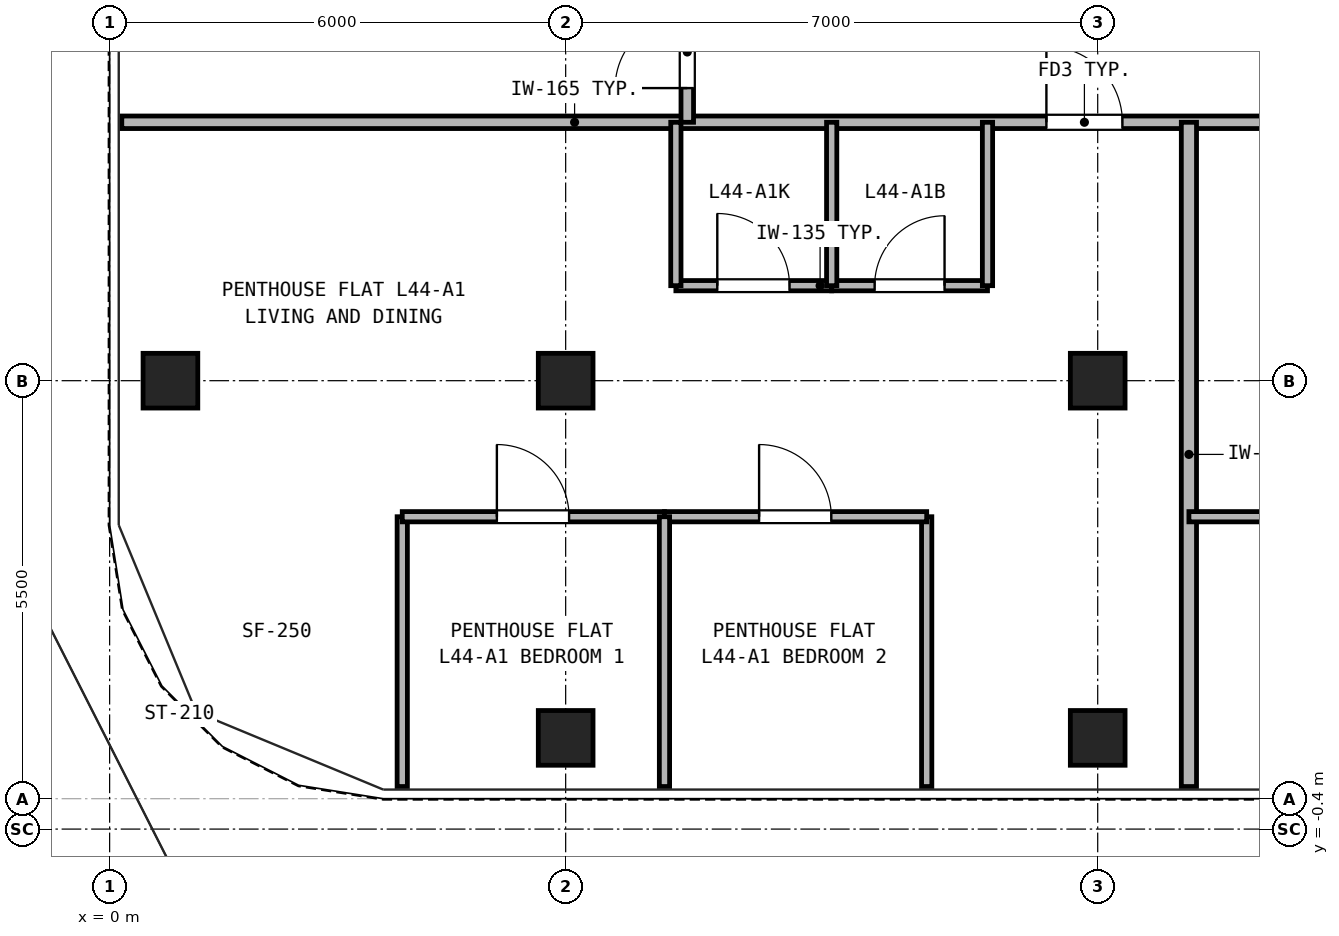
"""IFC4 building model, lengths in metres.
Left out: names, types, materials, properties, quantities, classifications, styles, units other than length and angle.
Written with IfcOpenShell. Run it as: python <this file> out.ifc"""

import sys

from ifc_helpers import new_model, si_unit, direction, frame, frame_2d, origin, origin_2d, place, context, subcontext, project, spatial, rectangle, hollow_rectangle, extrude, source, transform, mapped, element, fill, save


model = new_model("IFC4")
c1 = context("Model", 3, precision=1e-05, world=origin(), true_north=direction((0.0, 1.0)))
c2 = subcontext(c1, "Body", "Model", "MODEL_VIEW")
j1 = project(units=[si_unit("LENGTHUNIT", "METRE"), si_unit("PLANEANGLEUNIT", "RADIAN")], contexts=[c1])
p1 = place(None, origin())
s1 = spatial("IfcSite", under=j1, at=p1, CompositionType="ELEMENT")
p2 = place(p1, origin())
s2 = spatial("IfcBuilding", under=s1, at=p2, CompositionType="ELEMENT")
p3 = place(p2, frame((0.0, 0.0, 159.3)))
s3 = spatial("IfcBuildingStorey", under=s2, at=p3, CompositionType="ELEMENT", Elevation=159.3)
m1 = source(origin(), c2, "Body", "SweptSolid", [
    extrude(hollow_rectangle(XDim=0.72, YDim=0.72, WallThickness=0.04, at=origin_2d()), origin(), (0.0, 0.0, 1.0), 2.95),
])
for number, where, z_axis, x_axis in (
    (1, (6.0, 0.8, 0.0), (0.0, 0.0, 1.0), (1.0, 0.0, 0.0)),
    (2, (13.0, 0.8, 0.0), (0.0, 0.0, 1.0), (1.0, 0.0, 0.0)),
    (3, (0.8, 5.5, 0.0), (0.0, 0.0, 1.0), (1.0, 0.0, 0.0)),
    (4, (6.0, 5.5, 0.0), (0.0, 0.0, 1.0), (1.0, 0.0, 0.0)),
    (5, (13.0, 5.5, 0.0), (0.0, 0.0, 1.0), (1.0, 0.0, 0.0)),
):
    element("IfcColumn", number, at=place(p3, frame(where, z_axis=z_axis, x_axis=x_axis)), inside=s3, PredefinedType="COLUMN", context=c2, shape_type="MappedRepresentation", body=[
        mapped(m1, transform((0.0, 0.0, 0.0), x_axis=(1.0, 0.0, 0.0), y_axis=(0.0, 1.0, 0.0), z_axis=(0.0, 0.0, 1.0), scale=1.0)),
    ])
p4 = place(p3, frame((0.16, 8.9, 0.0), z_axis=(0.0, 0.0, 1.0), x_axis=(1.0, 0.0, 0.0)))
e6 = element("IfcWall", 6, at=p4, inside=s3, PredefinedType="PARTITIONING", context=c2, shape_type="SweptSolid", body=[
    extrude(rectangle(XDim=41.48, YDim=0.165, at=frame_2d((20.74, 0.0))), origin(), (0.0, 0.0, 1.0), 2.95),
])
p5 = place(p4, frame((12.165, 0.0, 0.0)))
e7 = element("IfcOpeningElement", 7, at=p5, cuts=e6, PredefinedType="OPENING", context=c2, shape_type="SweptSolid", body=[
    extrude(rectangle(XDim=1.0, YDim=2.15, at=frame_2d((0.5, 1.075))), frame((0.0, 0.093, 0.0), z_axis=(0.0, -1.0, 0.0), x_axis=(1.0, 0.0, 0.0)), (0.0, 0.0, 1.0), 0.185),
])
p6 = place(p4, frame((17.965, 0.0, 0.0)))
e8 = element("IfcOpeningElement", 8, at=p6, cuts=e6, PredefinedType="OPENING", context=c2, shape_type="SweptSolid", body=[
    extrude(rectangle(XDim=1.0, YDim=2.15, at=frame_2d((0.5, 1.075))), frame((0.0, 0.093, 0.0), z_axis=(0.0, -1.0, 0.0), x_axis=(1.0, 0.0, 0.0)), (0.0, 0.0, 1.0), 0.185),
])
p7 = place(p4, frame((31.115, 0.0, 0.0)))
e9 = element("IfcOpeningElement", 9, at=p7, cuts=e6, PredefinedType="OPENING", context=c2, shape_type="SweptSolid", body=[
    extrude(rectangle(XDim=1.0, YDim=2.15, at=frame_2d((0.5, 1.075))), frame((0.0, 0.093, 0.0), z_axis=(0.0, -1.0, 0.0), x_axis=(1.0, 0.0, 0.0)), (0.0, 0.0, 1.0), 0.185),
])
p8 = place(p3, frame((7.6, 8.9, 0.0), z_axis=(0.0, 0.0, 1.0), x_axis=(0.0, 1.0, 0.0)))
e10 = element("IfcWall", 10, at=p8, inside=s3, PredefinedType="PARTITIONING", context=c2, shape_type="SweptSolid", body=[
    extrude(rectangle(XDim=2.0, YDim=0.165, at=frame_2d((1.0, 0.0))), origin(), (0.0, 0.0, 1.0), 2.95),
])
p9 = place(p8, frame((0.45, 0.0, 0.0)))
e11 = element("IfcOpeningElement", 11, at=p9, cuts=e10, PredefinedType="OPENING", context=c2, shape_type="SweptSolid", body=[
    extrude(rectangle(XDim=0.95, YDim=2.15, at=frame_2d((0.475, 1.075))), frame((0.0, 0.093, 0.0), z_axis=(0.0, -1.0, 0.0), x_axis=(1.0, 0.0, 0.0)), (0.0, 0.0, 1.0), 0.185),
])
p10 = place(p3, frame((7.45, 6.75, 0.0), z_axis=(0.0, 0.0, 1.0), x_axis=(1.0, 0.0, 0.0)))
e12 = element("IfcWall", 12, at=p10, inside=s3, PredefinedType="PARTITIONING", context=c2, shape_type="SweptSolid", body=[
    extrude(rectangle(XDim=2.05, YDim=0.135, at=frame_2d((1.025, 0.0))), origin(), (0.0, 0.0, 1.0), 2.95),
])
p11 = place(p10, frame((0.545, 0.0, 0.0)))
e13 = element("IfcOpeningElement", 13, at=p11, cuts=e12, PredefinedType="OPENING", context=c2, shape_type="SweptSolid", body=[
    extrude(rectangle(XDim=0.95, YDim=2.15, at=frame_2d((0.475, 1.075))), frame((0.0, 0.077, 0.0), z_axis=(0.0, -1.0, 0.0), x_axis=(1.0, 0.0, 0.0)), (0.0, 0.0, 1.0), 0.155),
])
p12 = place(p3, frame((9.5, 6.75, 0.0), z_axis=(0.0, 0.0, 1.0), x_axis=(1.0, 0.0, 0.0)))
e14 = element("IfcWall", 14, at=p12, inside=s3, PredefinedType="PARTITIONING", context=c2, shape_type="SweptSolid", body=[
    extrude(rectangle(XDim=2.05, YDim=0.135, at=frame_2d((1.025, 0.0))), origin(), (0.0, 0.0, 1.0), 2.95),
])
p13 = place(p12, frame((0.565, 0.0, 0.0)))
e15 = element("IfcOpeningElement", 15, at=p13, cuts=e14, PredefinedType="OPENING", context=c2, shape_type="SweptSolid", body=[
    extrude(rectangle(XDim=0.92, YDim=2.1, at=frame_2d((0.46, 1.05))), frame((0.0, 0.077, 0.0), z_axis=(0.0, -1.0, 0.0), x_axis=(1.0, 0.0, 0.0)), (0.0, 0.0, 1.0), 0.155),
])
for number, where, z_axis, x_axis in (
    (16, (7.45, 6.75, 0.0), (0.0, 0.0, 1.0), (0.0, 1.0, 0.0)),
    (17, (9.5, 6.75, 0.0), (0.0, 0.0, 1.0), (0.0, 1.0, 0.0)),
    (18, (11.55, 6.75, 0.0), (0.0, 0.0, 1.0), (0.0, 1.0, 0.0)),
):
    element("IfcWall", number, at=place(p3, frame(where, z_axis=z_axis, x_axis=x_axis)), inside=s3, PredefinedType="PARTITIONING", context=c2, shape_type="SweptSolid", body=[
        extrude(rectangle(XDim=2.15, YDim=0.135, at=frame_2d((1.075, 0.0))), origin(), (0.0, 0.0, 1.0), 2.95),
    ])
for number, where, z_axis, x_axis in (
    (19, (3.85, 0.16, 0.0), (0.0, 0.0, 1.0), (0.0, 1.0, 0.0)),
    (20, (10.75, 0.16, 0.0), (0.0, 0.0, 1.0), (0.0, 1.0, 0.0)),
):
    element("IfcWall", number, at=place(p3, frame(where, z_axis=z_axis, x_axis=x_axis)), inside=s3, PredefinedType="PARTITIONING", context=c2, shape_type="SweptSolid", body=[
        extrude(rectangle(XDim=3.55, YDim=0.135, at=frame_2d((1.775, 0.0))), origin(), (0.0, 0.0, 1.0), 2.95),
    ])
p14 = place(p3, frame((3.85, 3.71, 0.0), z_axis=(0.0, 0.0, 1.0), x_axis=(1.0, 0.0, 0.0)))
e21 = element("IfcWall", 21, at=p14, inside=s3, PredefinedType="PARTITIONING", context=c2, shape_type="SweptSolid", body=[
    extrude(rectangle(XDim=3.45, YDim=0.135, at=frame_2d((1.725, 0.0))), origin(), (0.0, 0.0, 1.0), 2.95),
])
p15 = place(p14, frame((1.245, 0.0, 0.0)))
e22 = element("IfcOpeningElement", 22, at=p15, cuts=e21, PredefinedType="OPENING", context=c2, shape_type="SweptSolid", body=[
    extrude(rectangle(XDim=0.95, YDim=2.15, at=frame_2d((0.475, 1.075))), frame((0.0, 0.077, 0.0), z_axis=(0.0, -1.0, 0.0), x_axis=(1.0, 0.0, 0.0)), (0.0, 0.0, 1.0), 0.155),
])
p16 = place(p3, frame((7.3, 3.71, 0.0), z_axis=(0.0, 0.0, 1.0), x_axis=(1.0, 0.0, 0.0)))
e23 = element("IfcWall", 23, at=p16, inside=s3, PredefinedType="PARTITIONING", context=c2, shape_type="SweptSolid", body=[
    extrude(rectangle(XDim=3.45, YDim=0.135, at=frame_2d((1.725, 0.0))), origin(), (0.0, 0.0, 1.0), 2.95),
])
p17 = place(p16, frame((1.245, 0.0, 0.0)))
e24 = element("IfcOpeningElement", 24, at=p17, cuts=e23, PredefinedType="OPENING", context=c2, shape_type="SweptSolid", body=[
    extrude(rectangle(XDim=0.95, YDim=2.15, at=frame_2d((0.475, 1.075))), frame((0.0, 0.077, 0.0), z_axis=(0.0, -1.0, 0.0), x_axis=(1.0, 0.0, 0.0)), (0.0, 0.0, 1.0), 0.155),
])
p18 = place(p3, frame((7.3, 0.16, 0.0), z_axis=(0.0, 0.0, 1.0), x_axis=(0.0, 1.0, 0.0)))
e25 = element("IfcWall", 25, at=p18, inside=s3, PredefinedType="PARTITIONING", context=c2, shape_type="SweptSolid", body=[
    extrude(rectangle(XDim=3.55, YDim=0.135, at=frame_2d((1.775, 0.0))), origin(), (0.0, 0.0, 1.0), 2.95),
])
p19 = place(p3, frame((14.2, 0.16, 0.0), z_axis=(0.0, 0.0, 1.0), x_axis=(0.0, 1.0, 0.0)))
e26 = element("IfcWall", 26, at=p19, inside=s3, PredefinedType="PARTITIONING", context=c2, shape_type="SweptSolid", body=[
    extrude(rectangle(XDim=8.74, YDim=0.2, at=frame_2d((4.37, 0.0))), origin(), (0.0, 0.0, 1.0), 2.95),
])
p20 = place(p3, frame((14.2, 3.71, 0.0), z_axis=(0.0, 0.0, 1.0), x_axis=(1.0, 0.0, 0.0)))
e27 = element("IfcWall", 27, at=p20, inside=s3, PredefinedType="PARTITIONING", context=c2, shape_type="SweptSolid", body=[
    extrude(rectangle(XDim=6.82, YDim=0.135, at=frame_2d((3.41, 0.0))), origin(), (0.0, 0.0, 1.0), 2.95),
])
p21 = place(p20, frame((2.93, 0.0, 0.0)))
e28 = element("IfcOpeningElement", 28, at=p21, cuts=e27, PredefinedType="OPENING", context=c2, shape_type="SweptSolid", body=[
    extrude(rectangle(XDim=0.95, YDim=2.15, at=frame_2d((0.475, 1.075))), frame((0.0, 0.077, 0.0), z_axis=(0.0, -1.0, 0.0), x_axis=(1.0, 0.0, 0.0)), (0.0, 0.0, 1.0), 0.155),
])
p22 = place(p11, origin())
e29 = element("IfcDoor", 29, at=p22, inside=s3, OperationType="SINGLE_SWING_LEFT", PredefinedType="DOOR", context=c2, shape_type="SweptSolid", body=[
    extrude(rectangle(XDim=0.95, YDim=2.15, at=frame_2d((0.475, 1.075))), frame((0.0, 0.025, 0.0), z_axis=(0.0, -1.0, 0.0), x_axis=(1.0, 0.0, 0.0)), (0.0, 0.0, 1.0), 0.05),
])
fill(e13, e29)
p23 = place(p13, origin())
e30 = element("IfcDoor", 30, at=p23, inside=s3, OperationType="SINGLE_SWING_RIGHT", PredefinedType="DOOR", context=c2, shape_type="SweptSolid", body=[
    extrude(rectangle(XDim=0.92, YDim=2.1, at=frame_2d((0.46, 1.05))), frame((0.0, 0.025, 0.0), z_axis=(0.0, -1.0, 0.0), x_axis=(1.0, 0.0, 0.0)), (0.0, 0.0, 1.0), 0.05),
])
fill(e15, e30)
p24 = place(p15, frame((0.95, 0.0, 0.0), z_axis=(0.0, 0.0, 1.0), x_axis=(-1.0, 0.0, 0.0)))
e31 = element("IfcDoor", 31, at=p24, inside=s3, OperationType="SINGLE_SWING_LEFT", PredefinedType="DOOR", context=c2, shape_type="SweptSolid", body=[
    extrude(rectangle(XDim=0.95, YDim=2.15, at=frame_2d((0.475, 1.075))), frame((0.0, 0.025, 0.0), z_axis=(0.0, -1.0, 0.0), x_axis=(1.0, 0.0, 0.0)), (0.0, 0.0, 1.0), 0.05),
])
fill(e22, e31)
p25 = place(p17, frame((0.95, 0.0, 0.0), z_axis=(0.0, 0.0, 1.0), x_axis=(-1.0, 0.0, 0.0)))
e32 = element("IfcDoor", 32, at=p25, inside=s3, OperationType="SINGLE_SWING_LEFT", PredefinedType="DOOR", context=c2, shape_type="SweptSolid", body=[
    extrude(rectangle(XDim=0.95, YDim=2.15, at=frame_2d((0.475, 1.075))), frame((0.0, 0.025, 0.0), z_axis=(0.0, -1.0, 0.0), x_axis=(1.0, 0.0, 0.0)), (0.0, 0.0, 1.0), 0.05),
])
fill(e24, e32)
p26 = place(p5, frame((1.0, 0.0, 0.0), z_axis=(0.0, 0.0, 1.0), x_axis=(-1.0, 0.0, 0.0)))
e33 = element("IfcDoor", 33, at=p26, inside=s3, OperationType="SINGLE_SWING_LEFT", PredefinedType="DOOR", context=c2, shape_type="SweptSolid", body=[
    extrude(rectangle(XDim=1.0, YDim=2.15, at=frame_2d((0.5, 1.075))), frame((0.0, 0.025, 0.0), z_axis=(0.0, -1.0, 0.0), x_axis=(1.0, 0.0, 0.0)), (0.0, 0.0, 1.0), 0.05),
])
fill(e7, e33)
p27 = place(p9, frame((0.95, 0.0, 0.0), z_axis=(0.0, 0.0, 1.0), x_axis=(-1.0, 0.0, 0.0)))
e34 = element("IfcDoor", 34, at=p27, inside=s3, OperationType="SINGLE_SWING_LEFT", PredefinedType="DOOR", context=c2, shape_type="SweptSolid", body=[
    extrude(rectangle(XDim=0.95, YDim=2.15, at=frame_2d((0.475, 1.075))), frame((0.0, 0.025, 0.0), z_axis=(0.0, -1.0, 0.0), x_axis=(1.0, 0.0, 0.0)), (0.0, 0.0, 1.0), 0.05),
])
fill(e11, e34)
save(model, sys.argv[1])
